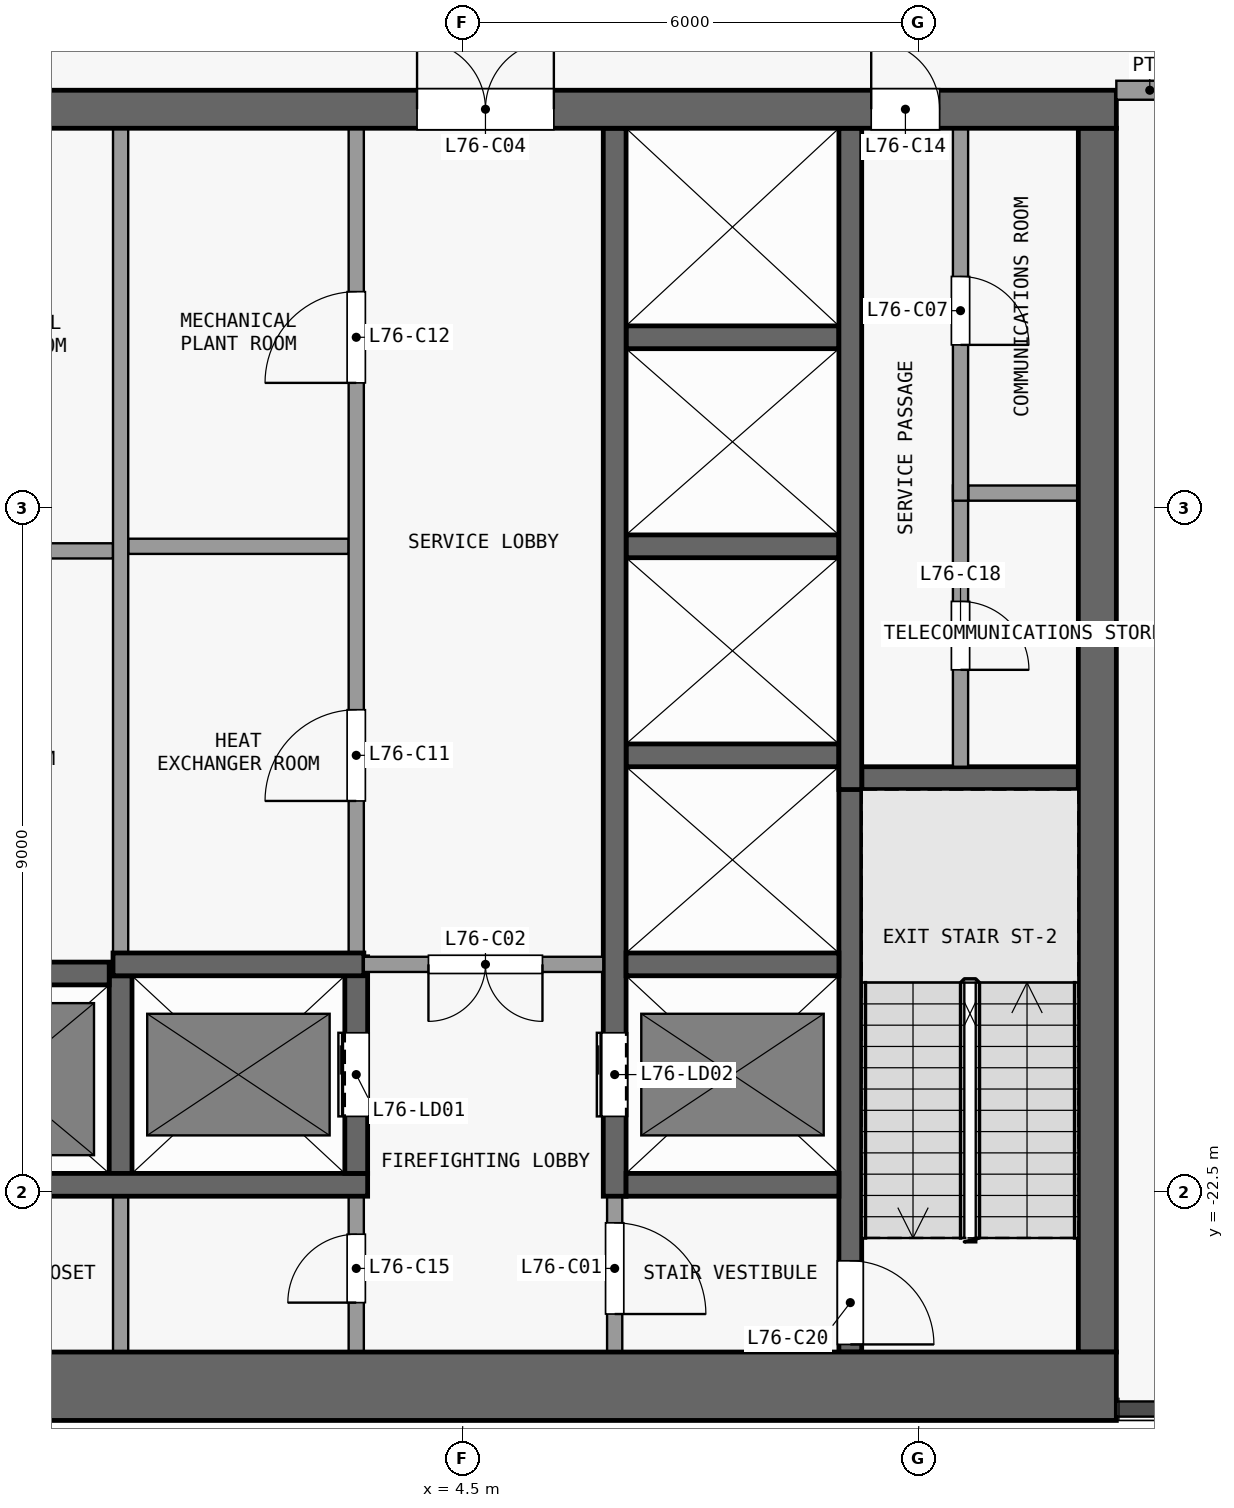
"""IFC4 building model, lengths in metres.
Left out: names, types, materials, properties, quantities, classifications, styles, units other than length and angle.
Written with IfcOpenShell. Run it as: python <this file> out.ifc"""

import sys

from ifc_helpers import new_model, si_unit, direction, frame, frame_2d, origin, place, context, subcontext, project, spatial, rectangle, extrude, element, fill, save


model = new_model("IFC4")
c1 = context("Model", 3, precision=1e-05, world=origin(), true_north=direction((0.0, 1.0)))
c2 = subcontext(c1, "Body", "Model", "MODEL_VIEW")
j1 = project(units=[si_unit("LENGTHUNIT", "METRE"), si_unit("PLANEANGLEUNIT", "RADIAN")], contexts=[c1])
p1 = place(None, origin())
s1 = spatial("IfcSite", under=j1, at=p1, CompositionType="ELEMENT")
p2 = place(p1, origin())
s2 = spatial("IfcBuilding", under=s1, at=p2, CompositionType="ELEMENT")
p3 = place(p2, frame((0.0, 0.0, 298.7)))
s3 = spatial("IfcBuildingStorey", under=s2, at=p3, CompositionType="ELEMENT", Elevation=298.7)
p4 = place(p3, frame((-13.1, -25.05, 0.0), z_axis=(0.0, 0.0, 1.0), x_axis=(1.0, 0.0, 0.0)))
e1 = element("IfcWall", 1, at=p4, inside=s3, PredefinedType="SHEAR", context=c2, shape_type="SweptSolid", body=[
    extrude(rectangle(XDim=26.2, YDim=0.9, at=frame_2d((13.1, 0.0))), origin(), (0.0, 0.0, 1.0), 4.2),
])
p5 = place(p3, frame((-13.1, -8.25, 0.0), z_axis=(0.0, 0.0, 1.0), x_axis=(1.0, 0.0, 0.0)))
e2 = element("IfcWall", 2, at=p5, inside=s3, PredefinedType="SHEAR", context=c2, shape_type="SweptSolid", body=[
    extrude(rectangle(XDim=26.2, YDim=0.5, at=frame_2d((13.1, 0.0))), origin(), (0.0, 0.0, 1.0), 4.2),
])
p6 = place(p5, frame((7.4, 0.0, 0.0)))
e3 = element("IfcOpeningElement", 3, at=p6, cuts=e2, PredefinedType="OPENING", context=c2, shape_type="SweptSolid", body=[
    extrude(rectangle(XDim=1.8, YDim=2.1, at=frame_2d((0.9, 1.05))), frame((0.0, 0.26, 0.0), z_axis=(0.0, -1.0, 0.0), x_axis=(1.0, 0.0, 0.0)), (0.0, 0.0, 1.0), 0.52),
])
p7 = place(p5, frame((17.0, 0.0, 0.0)))
e4 = element("IfcOpeningElement", 4, at=p7, cuts=e2, PredefinedType="OPENING", context=c2, shape_type="SweptSolid", body=[
    extrude(rectangle(XDim=1.8, YDim=2.1, at=frame_2d((0.9, 1.05))), frame((0.0, 0.26, 0.0), z_axis=(0.0, -1.0, 0.0), x_axis=(1.0, 0.0, 0.0)), (0.0, 0.0, 1.0), 0.52),
])
p8 = place(p5, frame((2.325, 0.0, 0.0)))
e5 = element("IfcOpeningElement", 5, at=p8, cuts=e2, PredefinedType="OPENING", context=c2, shape_type="SweptSolid", body=[
    extrude(rectangle(XDim=0.9, YDim=2.1, at=frame_2d((0.45, 1.05))), frame((0.0, 0.26, 0.0), z_axis=(0.0, -1.0, 0.0), x_axis=(1.0, 0.0, 0.0)), (0.0, 0.0, 1.0), 0.52),
])
p9 = place(p5, frame((22.975, 0.0, 0.0)))
e6 = element("IfcOpeningElement", 6, at=p9, cuts=e2, PredefinedType="OPENING", context=c2, shape_type="SweptSolid", body=[
    extrude(rectangle(XDim=0.9, YDim=2.1, at=frame_2d((0.45, 1.05))), frame((0.0, 0.26, 0.0), z_axis=(0.0, -1.0, 0.0), x_axis=(1.0, 0.0, 0.0)), (0.0, 0.0, 1.0), 0.52),
])
p10 = place(p3, frame((12.85, -24.6, 0.0), z_axis=(0.0, 0.0, 1.0), x_axis=(0.0, 1.0, 0.0)))
e7 = element("IfcWall", 7, at=p10, inside=s3, PredefinedType="SHEAR", context=c2, shape_type="SweptSolid", body=[
    extrude(rectangle(XDim=16.1, YDim=0.5, at=frame_2d((8.05, 0.0))), origin(), (0.0, 0.0, 1.0), 4.2),
])
p11 = place(p3, frame((-3.25, -22.4, 0.0), z_axis=(0.0, 0.0, 1.0), x_axis=(1.0, 0.0, 0.0)))
e8 = element("IfcWall", 8, at=p11, inside=s3, PredefinedType="SHEAR", context=c2, shape_type="SweptSolid", body=[
    extrude(rectangle(XDim=6.5, YDim=0.3, at=frame_2d((3.25, 0.0))), origin(), (0.0, 0.0, 1.0), 4.2),
])
p12 = place(p3, frame((6.65, -22.4, 0.0), z_axis=(0.0, 0.0, 1.0), x_axis=(1.0, 0.0, 0.0)))
e9 = element("IfcWall", 9, at=p12, inside=s3, PredefinedType="SHEAR", context=c2, shape_type="SweptSolid", body=[
    extrude(rectangle(XDim=2.8, YDim=0.3, at=frame_2d((1.4, 0.0))), origin(), (0.0, 0.0, 1.0), 4.2),
])
p13 = place(p3, frame((-3.2, -19.62, 0.0), z_axis=(0.0, 0.0, 1.0), x_axis=(1.0, 0.0, 0.0)))
e10 = element("IfcWall", 10, at=p13, inside=s3, PredefinedType="SHEAR", context=c2, shape_type="SweptSolid", body=[
    extrude(rectangle(XDim=3.05, YDim=0.3, at=frame_2d((1.525, 0.0))), origin(), (0.0, 0.0, 1.0), 4.2),
])
p14 = place(p3, frame((-0.1, -19.5, 0.0), z_axis=(0.0, 0.0, 1.0), x_axis=(1.0, 0.0, 0.0)))
e11 = element("IfcWall", 11, at=p14, inside=s3, PredefinedType="SHEAR", context=c2, shape_type="SweptSolid", body=[
    extrude(rectangle(XDim=3.3, YDim=0.3, at=frame_2d((1.65, 0.0))), origin(), (0.0, 0.0, 1.0), 4.2),
])
p15 = place(p3, frame((6.35, -19.5, 0.0), z_axis=(0.0, 0.0, 1.0), x_axis=(-1.0, 0.0, 0.0)))
e12 = element("IfcWall", 12, at=p15, inside=s3, PredefinedType="PARTITIONING", context=c2, shape_type="SweptSolid", body=[
    extrude(rectangle(XDim=3.15, YDim=0.2, at=frame_2d((1.575, 0.0))), origin(), (0.0, 0.0, 1.0), 4.2),
])
p16 = place(p15, frame((0.8, 0.0, 0.0)))
e13 = element("IfcOpeningElement", 13, at=p16, cuts=e12, PredefinedType="OPENING", context=c2, shape_type="SweptSolid", body=[
    extrude(rectangle(XDim=1.5, YDim=2.1, at=frame_2d((0.75, 1.05))), frame((0.0, 0.11, 0.0), z_axis=(0.0, -1.0, 0.0), x_axis=(1.0, 0.0, 0.0)), (0.0, 0.0, 1.0), 0.22),
])
p17 = place(p3, frame((6.65, -19.5, 0.0), z_axis=(0.0, 0.0, 1.0), x_axis=(1.0, 0.0, 0.0)))
e14 = element("IfcWall", 14, at=p17, inside=s3, PredefinedType="SHEAR", context=c2, shape_type="SweptSolid", body=[
    extrude(rectangle(XDim=2.8, YDim=0.3, at=frame_2d((1.4, 0.0))), origin(), (0.0, 0.0, 1.0), 4.2),
])
p18 = place(p3, frame((9.75, -17.05, 0.0), z_axis=(0.0, 0.0, 1.0), x_axis=(1.0, 0.0, 0.0)))
e15 = element("IfcWall", 15, at=p18, inside=s3, PredefinedType="SHEAR", context=c2, shape_type="SweptSolid", body=[
    extrude(rectangle(XDim=2.85, YDim=0.3, at=frame_2d((1.425, 0.0))), origin(), (0.0, 0.0, 1.0), 4.2),
])
p19 = place(p3, frame((6.65, -16.75, 0.0), z_axis=(0.0, 0.0, 1.0), x_axis=(1.0, 0.0, 0.0)))
e16 = element("IfcWall", 16, at=p19, inside=s3, PredefinedType="SHEAR", context=c2, shape_type="SweptSolid", body=[
    extrude(rectangle(XDim=2.8, YDim=0.3, at=frame_2d((1.4, 0.0))), origin(), (0.0, 0.0, 1.0), 4.2),
])
for number, where, z_axis, x_axis in (
    (17, (-3.0, -14.06, 0.0), (0.0, 0.0, 1.0), (1.0, 0.0, 0.0)),
    (18, (0.1, -14.0, 0.0), (0.0, 0.0, 1.0), (1.0, 0.0, 0.0)),
):
    element("IfcWall", number, at=place(p3, frame(where, z_axis=z_axis, x_axis=x_axis)), inside=s3, PredefinedType="PARTITIONING", context=c2, shape_type="SweptSolid", body=[
        extrude(rectangle(XDim=2.9, YDim=0.2, at=frame_2d((1.45, 0.0))), origin(), (0.0, 0.0, 1.0), 4.2),
    ])
p20 = place(p3, frame((6.65, -14.0, 0.0), z_axis=(0.0, 0.0, 1.0), x_axis=(1.0, 0.0, 0.0)))
e19 = element("IfcWall", 19, at=p20, inside=s3, PredefinedType="SHEAR", context=c2, shape_type="SweptSolid", body=[
    extrude(rectangle(XDim=2.8, YDim=0.3, at=frame_2d((1.4, 0.0))), origin(), (0.0, 0.0, 1.0), 4.2),
])
p21 = place(p3, frame((11.15, -13.3, 0.0), z_axis=(0.0, 0.0, 1.0), x_axis=(1.0, 0.0, 0.0)))
e20 = element("IfcWall", 20, at=p21, inside=s3, PredefinedType="PARTITIONING", context=c2, shape_type="SweptSolid", body=[
    extrude(rectangle(XDim=1.45, YDim=0.2, at=frame_2d((0.725, 0.0))), origin(), (0.0, 0.0, 1.0), 4.2),
])
p22 = place(p3, frame((6.65, -11.25, 0.0), z_axis=(0.0, 0.0, 1.0), x_axis=(1.0, 0.0, 0.0)))
e21 = element("IfcWall", 21, at=p22, inside=s3, PredefinedType="SHEAR", context=c2, shape_type="SweptSolid", body=[
    extrude(rectangle(XDim=2.8, YDim=0.3, at=frame_2d((1.4, 0.0))), origin(), (0.0, 0.0, 1.0), 4.2),
])
p23 = place(p3, frame((0.0, -24.6, 0.0), z_axis=(0.0, 0.0, 1.0), x_axis=(0.0, 1.0, 0.0)))
e22 = element("IfcWall", 22, at=p23, inside=s3, PredefinedType="PARTITIONING", context=c2, shape_type="SweptSolid", body=[
    extrude(rectangle(XDim=2.05, YDim=0.2, at=frame_2d((1.025, 0.0))), origin(), (0.0, 0.0, 1.0), 4.2),
])
p24 = place(p3, frame((0.0, -22.25, 0.0), z_axis=(0.0, 0.0, 1.0), x_axis=(0.0, 1.0, 0.0)))
e23 = element("IfcWall", 23, at=p24, inside=s3, PredefinedType="SHEAR", context=c2, shape_type="SweptSolid", body=[
    extrude(rectangle(XDim=2.6, YDim=0.3, at=frame_2d((1.3, 0.0))), origin(), (0.0, 0.0, 1.0), 4.2),
])
p25 = place(p3, frame((0.0, -19.35, 0.0), z_axis=(0.0, 0.0, 1.0), x_axis=(0.0, 1.0, 0.0)))
e24 = element("IfcWall", 24, at=p25, inside=s3, PredefinedType="PARTITIONING", context=c2, shape_type="SweptSolid", body=[
    extrude(rectangle(XDim=10.85, YDim=0.2, at=frame_2d((5.425, 0.0))), origin(), (0.0, 0.0, 1.0), 4.2),
])
p26 = place(p3, frame((3.1, -24.6, 0.0), z_axis=(0.0, 0.0, 1.0), x_axis=(0.0, 1.0, 0.0)))
e25 = element("IfcWall", 25, at=p26, inside=s3, PredefinedType="PARTITIONING", context=c2, shape_type="SweptSolid", body=[
    extrude(rectangle(XDim=2.05, YDim=0.2, at=frame_2d((1.025, 0.0))), origin(), (0.0, 0.0, 1.0), 4.2),
])
p27 = place(p26, frame((0.65, 0.0, 0.0)))
e26 = element("IfcOpeningElement", 26, at=p27, cuts=e25, PredefinedType="OPENING", context=c2, shape_type="SweptSolid", body=[
    extrude(rectangle(XDim=0.9, YDim=2.1, at=frame_2d((0.45, 1.05))), frame((0.0, 0.11, 0.0), z_axis=(0.0, -1.0, 0.0), x_axis=(1.0, 0.0, 0.0)), (0.0, 0.0, 1.0), 0.22),
])
p28 = place(p3, frame((3.1, -22.25, 0.0), z_axis=(0.0, 0.0, 1.0), x_axis=(0.0, 1.0, 0.0)))
e27 = element("IfcWall", 27, at=p28, inside=s3, PredefinedType="SHEAR", context=c2, shape_type="SweptSolid", body=[
    extrude(rectangle(XDim=2.85, YDim=0.3, at=frame_2d((1.425, 0.0))), origin(), (0.0, 0.0, 1.0), 4.2),
])
p29 = place(p28, frame((0.75, 0.0, 0.0)))
e28 = element("IfcOpeningElement", 28, at=p29, cuts=e27, PredefinedType="OPENING", context=c2, shape_type="SweptSolid", body=[
    extrude(rectangle(XDim=1.1, YDim=2.1, at=frame_2d((0.55, 1.05))), frame((0.0, 0.16, 0.0), z_axis=(0.0, -1.0, 0.0), x_axis=(1.0, 0.0, 0.0)), (0.0, 0.0, 1.0), 0.32),
])
p30 = place(p3, frame((3.1, -19.6, 0.0), z_axis=(0.0, 0.0, 1.0), x_axis=(0.0, 1.0, 0.0)))
e29 = element("IfcWall", 29, at=p30, inside=s3, PredefinedType="PARTITIONING", context=c2, shape_type="SweptSolid", body=[
    extrude(rectangle(XDim=11.1, YDim=0.2, at=frame_2d((5.55, 0.0))), origin(), (0.0, 0.0, 1.0), 4.2),
])
p31 = place(p30, frame((2.25, 0.0, 0.0)))
e30 = element("IfcOpeningElement", 30, at=p31, cuts=e29, PredefinedType="OPENING", context=c2, shape_type="SweptSolid", body=[
    extrude(rectangle(XDim=1.2, YDim=2.1, at=frame_2d((0.6, 1.05))), frame((0.0, 0.11, 0.0), z_axis=(0.0, -1.0, 0.0), x_axis=(1.0, 0.0, 0.0)), (0.0, 0.0, 1.0), 0.22),
])
p32 = place(p30, frame((7.75, 0.0, 0.0)))
e31 = element("IfcOpeningElement", 31, at=p32, cuts=e29, PredefinedType="OPENING", context=c2, shape_type="SweptSolid", body=[
    extrude(rectangle(XDim=1.2, YDim=2.1, at=frame_2d((0.6, 1.05))), frame((0.0, 0.11, 0.0), z_axis=(0.0, -1.0, 0.0), x_axis=(1.0, 0.0, 0.0)), (0.0, 0.0, 1.0), 0.22),
])
p33 = place(p3, frame((6.5, -22.55, 0.0), z_axis=(0.0, 0.0, 1.0), x_axis=(0.0, -1.0, 0.0)))
e32 = element("IfcWall", 32, at=p33, inside=s3, PredefinedType="PARTITIONING", context=c2, shape_type="SweptSolid", body=[
    extrude(rectangle(XDim=2.05, YDim=0.2, at=frame_2d((1.025, 0.0))), origin(), (0.0, 0.0, 1.0), 4.2),
])
p34 = place(p33, frame((0.35, 0.0, 0.0)))
e33 = element("IfcOpeningElement", 33, at=p34, cuts=e32, PredefinedType="OPENING", context=c2, shape_type="SweptSolid", body=[
    extrude(rectangle(XDim=1.2, YDim=2.1, at=frame_2d((0.6, 1.05))), frame((0.0, 0.11, 0.0), z_axis=(0.0, -1.0, 0.0), x_axis=(1.0, 0.0, 0.0)), (0.0, 0.0, 1.0), 0.22),
])
p35 = place(p3, frame((6.5, -22.55, 0.0), z_axis=(0.0, 0.0, 1.0), x_axis=(0.0, 1.0, 0.0)))
e34 = element("IfcWall", 34, at=p35, inside=s3, PredefinedType="SHEAR", context=c2, shape_type="SweptSolid", body=[
    extrude(rectangle(XDim=14.05, YDim=0.3, at=frame_2d((7.025, 0.0))), origin(), (0.0, 0.0, 1.0), 4.2),
])
p36 = place(p35, frame((1.05, 0.0, 0.0)))
e35 = element("IfcOpeningElement", 35, at=p36, cuts=e34, PredefinedType="OPENING", context=c2, shape_type="SweptSolid", body=[
    extrude(rectangle(XDim=1.1, YDim=2.1, at=frame_2d((0.55, 1.05))), frame((0.0, 0.16, 0.0), z_axis=(0.0, -1.0, 0.0), x_axis=(1.0, 0.0, 0.0)), (0.0, 0.0, 1.0), 0.32),
])
p37 = place(p3, frame((9.6, -16.9, 0.0), z_axis=(0.0, 0.0, 1.0), x_axis=(0.0, -1.0, 0.0)))
e36 = element("IfcWall", 36, at=p37, inside=s3, PredefinedType="SHEAR", context=c2, shape_type="SweptSolid", body=[
    extrude(rectangle(XDim=7.7, YDim=0.3, at=frame_2d((3.85, 0.0))), origin(), (0.0, 0.0, 1.0), 4.2),
])
p38 = place(p37, frame((6.5, 0.0, 0.0)))
e37 = element("IfcOpeningElement", 37, at=p38, cuts=e36, PredefinedType="OPENING", context=c2, shape_type="SweptSolid", body=[
    extrude(rectangle(XDim=1.1, YDim=2.1, at=frame_2d((0.55, 1.05))), frame((0.0, 0.16, 0.0), z_axis=(0.0, -1.0, 0.0), x_axis=(1.0, 0.0, 0.0)), (0.0, 0.0, 1.0), 0.32),
])
p39 = place(p3, frame((9.6, -17.2, 0.0), z_axis=(0.0, 0.0, 1.0), x_axis=(0.0, 1.0, 0.0)))
e38 = element("IfcWall", 38, at=p39, inside=s3, PredefinedType="SHEAR", context=c2, shape_type="SweptSolid", body=[
    extrude(rectangle(XDim=8.7, YDim=0.3, at=frame_2d((4.35, 0.0))), origin(), (0.0, 0.0, 1.0), 4.2),
])
p40 = place(p3, frame((11.05, -13.2, 0.0), z_axis=(0.0, 0.0, 1.0), x_axis=(0.0, -1.0, 0.0)))
e39 = element("IfcWall", 39, at=p40, inside=s3, PredefinedType="PARTITIONING", context=c2, shape_type="SweptSolid", body=[
    extrude(rectangle(XDim=3.7, YDim=0.2, at=frame_2d((1.85, 0.0))), origin(), (0.0, 0.0, 1.0), 4.2),
])
p41 = place(p40, frame((1.525, 0.0, 0.0)))
e40 = element("IfcOpeningElement", 40, at=p41, cuts=e39, PredefinedType="OPENING", context=c2, shape_type="SweptSolid", body=[
    extrude(rectangle(XDim=0.9, YDim=2.1, at=frame_2d((0.45, 1.05))), frame((0.0, 0.11, 0.0), z_axis=(0.0, -1.0, 0.0), x_axis=(1.0, 0.0, 0.0)), (0.0, 0.0, 1.0), 0.22),
])
p42 = place(p3, frame((11.05, -8.5, 0.0), z_axis=(0.0, 0.0, 1.0), x_axis=(0.0, -1.0, 0.0)))
e41 = element("IfcWall", 41, at=p42, inside=s3, PredefinedType="PARTITIONING", context=c2, shape_type="SweptSolid", body=[
    extrude(rectangle(XDim=4.9, YDim=0.2, at=frame_2d((2.45, 0.0))), origin(), (0.0, 0.0, 1.0), 4.2),
])
p43 = place(p42, frame((1.95, 0.0, 0.0)))
e42 = element("IfcOpeningElement", 42, at=p43, cuts=e41, PredefinedType="OPENING", context=c2, shape_type="SweptSolid", body=[
    extrude(rectangle(XDim=0.9, YDim=2.1, at=frame_2d((0.45, 1.05))), frame((0.0, 0.11, 0.0), z_axis=(0.0, -1.0, 0.0), x_axis=(1.0, 0.0, 0.0)), (0.0, 0.0, 1.0), 0.22),
])
p44 = place(p3, frame((13.1, -8.0, 0.0), z_axis=(0.0, 0.0, 1.0), x_axis=(1.0, 0.0, 0.0)))
e43 = element("IfcWall", 43, at=p44, inside=s3, PredefinedType="PARTITIONING", context=c2, shape_type="SweptSolid", body=[
    extrude(rectangle(XDim=3.15, YDim=0.25, at=frame_2d((1.575, 0.0))), origin(), (0.0, 0.0, 1.0), 4.2),
])
p45 = place(p44, frame((1.0, 0.0, 0.0)))
e44 = element("IfcOpeningElement", 44, at=p45, cuts=e43, PredefinedType="OPENING", context=c2, shape_type="SweptSolid", body=[
    extrude(rectangle(XDim=1.2, YDim=2.1, at=frame_2d((0.6, 1.05))), frame((0.0, 0.135, 0.0), z_axis=(0.0, -1.0, 0.0), x_axis=(1.0, 0.0, 0.0)), (0.0, 0.0, 1.0), 0.27),
])
p46 = place(p29, origin())
e45 = element("IfcDoor", 45, at=p46, inside=s3, OperationType="DOUBLE_DOOR_SLIDING", PredefinedType="DOOR", context=c2, shape_type="SweptSolid", body=[
    extrude(rectangle(XDim=1.1, YDim=2.1, at=frame_2d((0.55, 1.05))), frame((0.0, 0.025, 0.0), z_axis=(0.0, -1.0, 0.0), x_axis=(1.0, 0.0, 0.0)), (0.0, 0.0, 1.0), 0.05),
])
fill(e28, e45)
p47 = place(p36, origin())
e46 = element("IfcDoor", 46, at=p47, inside=s3, OperationType="DOUBLE_DOOR_SLIDING", PredefinedType="DOOR", context=c2, shape_type="SweptSolid", body=[
    extrude(rectangle(XDim=1.1, YDim=2.1, at=frame_2d((0.55, 1.05))), frame((0.0, 0.025, 0.0), z_axis=(0.0, -1.0, 0.0), x_axis=(1.0, 0.0, 0.0)), (0.0, 0.0, 1.0), 0.05),
])
fill(e35, e46)
p48 = place(p34, origin())
e47 = element("IfcDoor", 47, at=p48, inside=s3, OperationType="SINGLE_SWING_RIGHT", PredefinedType="DOOR", context=c2, shape_type="SweptSolid", body=[
    extrude(rectangle(XDim=1.2, YDim=2.1, at=frame_2d((0.6, 1.05))), frame((0.0, 0.025, 0.0), z_axis=(0.0, -1.0, 0.0), x_axis=(1.0, 0.0, 0.0)), (0.0, 0.0, 1.0), 0.05),
])
fill(e33, e47)
p49 = place(p16, origin())
e48 = element("IfcDoor", 48, at=p49, inside=s3, OperationType="DOUBLE_DOOR_SINGLE_SWING", PredefinedType="DOOR", context=c2, shape_type="SweptSolid", body=[
    extrude(rectangle(XDim=1.5, YDim=2.1, at=frame_2d((0.75, 1.05))), frame((0.0, 0.025, 0.0), z_axis=(0.0, -1.0, 0.0), x_axis=(1.0, 0.0, 0.0)), (0.0, 0.0, 1.0), 0.05),
])
fill(e13, e48)
p50 = place(p7, origin())
e49 = element("IfcDoor", 49, at=p50, inside=s3, OperationType="DOUBLE_DOOR_SINGLE_SWING", PredefinedType="DOOR", context=c2, shape_type="SweptSolid", body=[
    extrude(rectangle(XDim=1.8, YDim=2.1, at=frame_2d((0.9, 1.05))), frame((0.0, 0.025, 0.0), z_axis=(0.0, -1.0, 0.0), x_axis=(1.0, 0.0, 0.0)), (0.0, 0.0, 1.0), 0.05),
])
fill(e4, e49)
p51 = place(p43, origin())
e50 = element("IfcDoor", 50, at=p51, inside=s3, OperationType="SINGLE_SWING_RIGHT", PredefinedType="DOOR", context=c2, shape_type="SweptSolid", body=[
    extrude(rectangle(XDim=0.9, YDim=2.1, at=frame_2d((0.45, 1.05))), frame((0.0, 0.025, 0.0), z_axis=(0.0, -1.0, 0.0), x_axis=(1.0, 0.0, 0.0)), (0.0, 0.0, 1.0), 0.05),
])
fill(e42, e50)
p52 = place(p31, origin())
e51 = element("IfcDoor", 51, at=p52, inside=s3, OperationType="SINGLE_SWING_LEFT", PredefinedType="DOOR", context=c2, shape_type="SweptSolid", body=[
    extrude(rectangle(XDim=1.2, YDim=2.1, at=frame_2d((0.6, 1.05))), frame((0.0, 0.025, 0.0), z_axis=(0.0, -1.0, 0.0), x_axis=(1.0, 0.0, 0.0)), (0.0, 0.0, 1.0), 0.05),
])
fill(e30, e51)
p53 = place(p32, origin())
e52 = element("IfcDoor", 52, at=p53, inside=s3, OperationType="SINGLE_SWING_LEFT", PredefinedType="DOOR", context=c2, shape_type="SweptSolid", body=[
    extrude(rectangle(XDim=1.2, YDim=2.1, at=frame_2d((0.6, 1.05))), frame((0.0, 0.025, 0.0), z_axis=(0.0, -1.0, 0.0), x_axis=(1.0, 0.0, 0.0)), (0.0, 0.0, 1.0), 0.05),
])
fill(e31, e52)
p54 = place(p9, origin())
e53 = element("IfcDoor", 53, at=p54, inside=s3, OperationType="SINGLE_SWING_LEFT", PredefinedType="DOOR", context=c2, shape_type="SweptSolid", body=[
    extrude(rectangle(XDim=0.9, YDim=2.1, at=frame_2d((0.45, 1.05))), frame((0.0, 0.025, 0.0), z_axis=(0.0, -1.0, 0.0), x_axis=(1.0, 0.0, 0.0)), (0.0, 0.0, 1.0), 0.05),
])
fill(e6, e53)
p55 = place(p27, origin())
e54 = element("IfcDoor", 54, at=p55, inside=s3, OperationType="SINGLE_SWING_LEFT", PredefinedType="DOOR", context=c2, shape_type="SweptSolid", body=[
    extrude(rectangle(XDim=0.9, YDim=2.1, at=frame_2d((0.45, 1.05))), frame((0.0, 0.025, 0.0), z_axis=(0.0, -1.0, 0.0), x_axis=(1.0, 0.0, 0.0)), (0.0, 0.0, 1.0), 0.05),
])
fill(e26, e54)
p56 = place(p41, origin())
e55 = element("IfcDoor", 55, at=p56, inside=s3, OperationType="SINGLE_SWING_RIGHT", PredefinedType="DOOR", context=c2, shape_type="SweptSolid", body=[
    extrude(rectangle(XDim=0.9, YDim=2.1, at=frame_2d((0.45, 1.05))), frame((0.0, 0.025, 0.0), z_axis=(0.0, -1.0, 0.0), x_axis=(1.0, 0.0, 0.0)), (0.0, 0.0, 1.0), 0.05),
])
fill(e40, e55)
p57 = place(p38, origin())
e56 = element("IfcDoor", 56, at=p57, inside=s3, OperationType="SINGLE_SWING_RIGHT", PredefinedType="DOOR", context=c2, shape_type="SweptSolid", body=[
    extrude(rectangle(XDim=1.1, YDim=2.1, at=frame_2d((0.55, 1.05))), frame((0.0, 0.025, 0.0), z_axis=(0.0, -1.0, 0.0), x_axis=(1.0, 0.0, 0.0)), (0.0, 0.0, 1.0), 0.05),
])
fill(e37, e56)
save(model, sys.argv[1])
